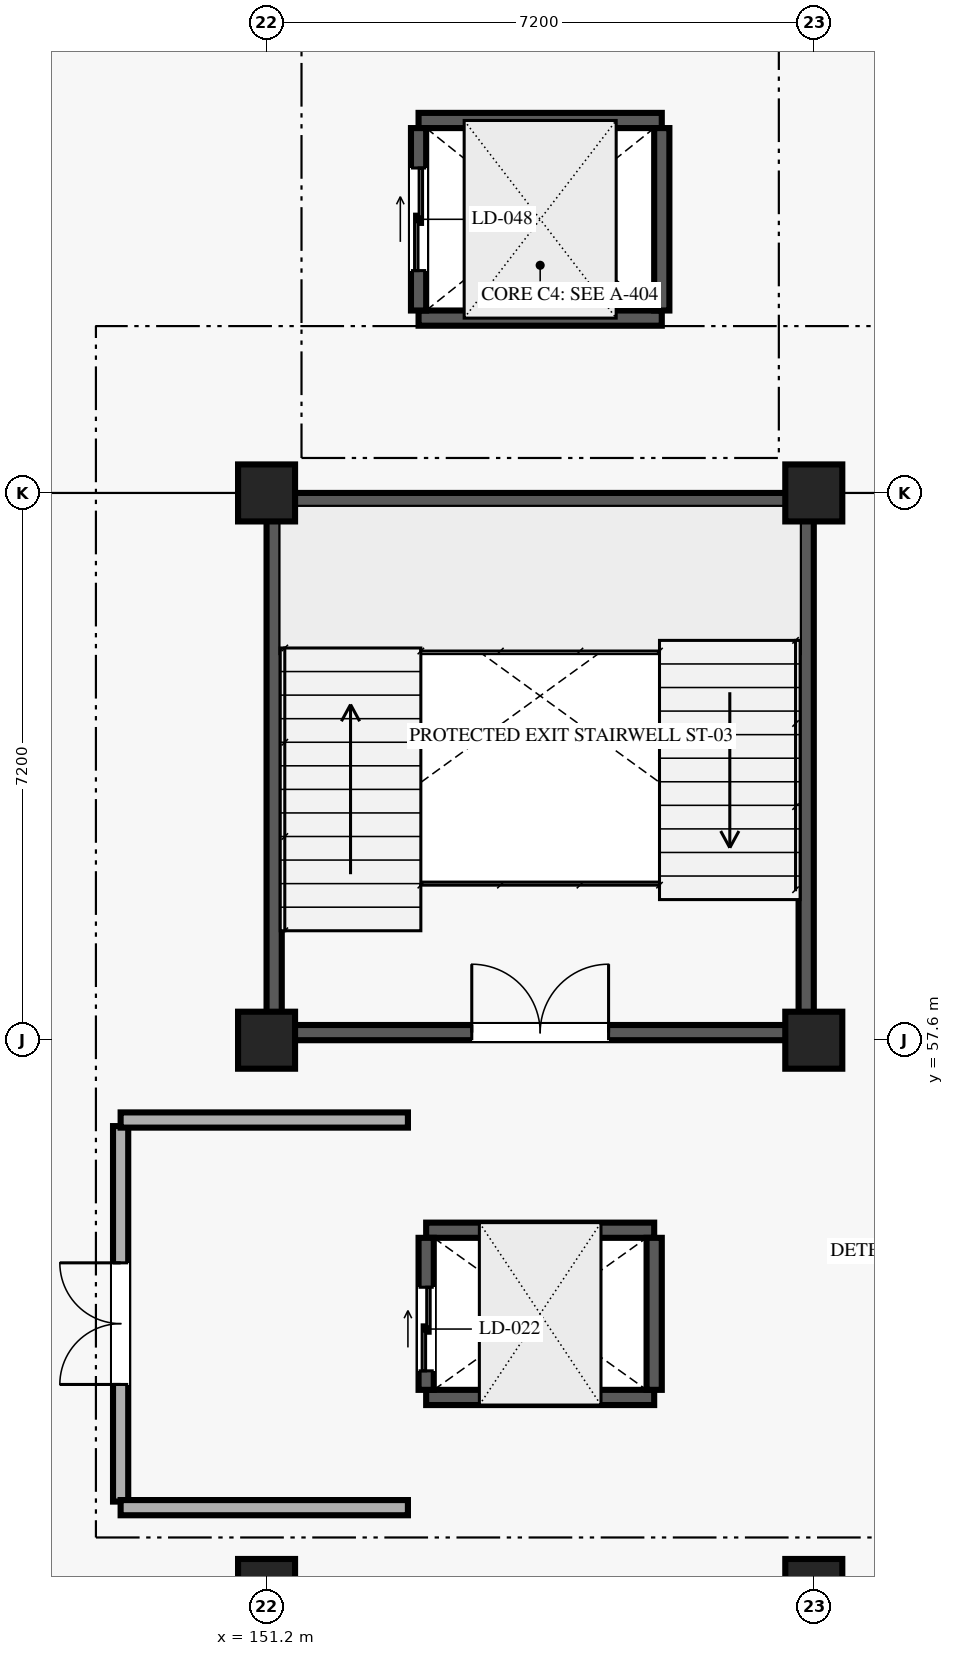
"""IFC4 building model, lengths in metres.
Left out: names, types, materials, properties, quantities, classifications, styles, units other than length and angle.
Written with IfcOpenShell. Run it as: python <this file> out.ifc"""

import sys

from ifc_helpers import new_model, si_unit, direction, frame, frame_2d, origin, origin_2d, place, context, subcontext, project, spatial, rectangle, extrude, element, fill, save


model = new_model("IFC4")
c1 = context("Model", 3, precision=1e-05, world=origin(), true_north=direction((0.0, 1.0)))
c2 = subcontext(c1, "Body", "Model", "MODEL_VIEW")
j1 = project(units=[si_unit("LENGTHUNIT", "METRE"), si_unit("PLANEANGLEUNIT", "RADIAN")], contexts=[c1])
p1 = place(None, origin())
s1 = spatial("IfcSite", under=j1, at=p1, CompositionType="ELEMENT")
p2 = place(p1, origin())
s2 = spatial("IfcBuilding", under=s1, at=p2, CompositionType="ELEMENT")
p3 = place(p2, frame((0.0, 0.0, 9.45)))
s3 = spatial("IfcBuildingStorey", under=s2, at=p3, CompositionType="ELEMENT", Elevation=9.45)
for number, where, z_axis, x_axis in (
    (1, (151.2, 50.4, 0.0), (0.0, 0.0, 1.0), (1.0, 0.0, 0.0)),
    (2, (151.2, 57.6, 0.0), (0.0, 0.0, 1.0), (1.0, 0.0, 0.0)),
    (3, (151.2, 64.8, 0.0), (0.0, 0.0, 1.0), (1.0, 0.0, 0.0)),
    (4, (158.4, 50.4, 0.0), (0.0, 0.0, 1.0), (1.0, 0.0, 0.0)),
    (5, (158.4, 57.6, 0.0), (0.0, 0.0, 1.0), (1.0, 0.0, 0.0)),
    (6, (158.4, 64.8, 0.0), (0.0, 0.0, 1.0), (1.0, 0.0, 0.0)),
):
    element("IfcColumn", number, at=place(p3, frame(where, z_axis=z_axis, x_axis=x_axis)), inside=s3, PredefinedType="COLUMN", context=c2, shape_type="SweptSolid", body=[
        extrude(rectangle(XDim=0.75, YDim=0.75, at=origin_2d()), origin(), (0.0, 0.0, 1.0), 4.05),
    ])
p4 = place(p3, frame((151.4, 57.7, 0.0), z_axis=(0.0, 0.0, 1.0), x_axis=(1.0, 0.0, 0.0)))
e7 = element("IfcWall", 7, at=p4, inside=s3, PredefinedType="SHEAR", context=c2, shape_type="SweptSolid", body=[
    extrude(rectangle(XDim=6.8, YDim=0.2, at=frame_2d((3.4, 0.0))), origin(), (0.0, 0.0, 1.0), 3.81),
])
p5 = place(p4, frame((2.5, 0.0, 0.0)))
e8 = element("IfcOpeningElement", 8, at=p5, cuts=e7, PredefinedType="OPENING", context=c2, shape_type="SweptSolid", body=[
    extrude(rectangle(XDim=1.8, YDim=2.2, at=frame_2d((0.9, 1.1))), frame((0.0, 0.11, 0.0), z_axis=(0.0, -1.0, 0.0), x_axis=(1.0, 0.0, 0.0)), (0.0, 0.0, 1.0), 0.22),
])
for number, where, z_axis, x_axis in (
    (9, (151.4, 64.7, 0.0), (0.0, 0.0, 1.0), (1.0, 0.0, 0.0)),
    (10, (151.3, 57.8, 0.0), (0.0, 0.0, 1.0), (0.0, 1.0, 0.0)),
    (11, (158.3, 57.8, 0.0), (0.0, 0.0, 1.0), (0.0, 1.0, 0.0)),
):
    element("IfcWall", number, at=place(p3, frame(where, z_axis=z_axis, x_axis=x_axis)), inside=s3, PredefinedType="SHEAR", context=c2, shape_type="SweptSolid", body=[
        extrude(rectangle(XDim=6.8, YDim=0.2, at=frame_2d((3.4, 0.0))), origin(), (0.0, 0.0, 1.0), 3.81),
    ])
for number, where, z_axis, x_axis in (
    (12, (153.3, 52.9, 0.0), (0.0, 0.0, 1.0), (1.0, 0.0, 0.0)),
    (13, (153.3, 55.1, 0.0), (0.0, 0.0, 1.0), (1.0, 0.0, 0.0)),
):
    element("IfcWall", number, at=place(p3, frame(where, z_axis=z_axis, x_axis=x_axis)), inside=s3, PredefinedType="SHEAR", context=c2, shape_type="SweptSolid", body=[
        extrude(rectangle(XDim=3.0, YDim=0.2, at=frame_2d((1.5, 0.0))), origin(), (0.0, 0.0, 1.0), 3.81),
    ])
p6 = place(p3, frame((153.3, 53.0, 0.0), z_axis=(0.0, 0.0, 1.0), x_axis=(0.0, 1.0, 0.0)))
e14 = element("IfcWall", 14, at=p6, inside=s3, PredefinedType="SHEAR", context=c2, shape_type="SweptSolid", body=[
    extrude(rectangle(XDim=2.0, YDim=0.2, at=frame_2d((1.0, 0.0))), origin(), (0.0, 0.0, 1.0), 3.81),
])
p7 = place(p6, frame((0.25, 0.0, 0.0)))
e15 = element("IfcOpeningElement", 15, at=p7, cuts=e14, PredefinedType="OPENING", context=c2, shape_type="SweptSolid", body=[
    extrude(rectangle(XDim=1.1, YDim=2.15, at=frame_2d((0.55, 1.075))), frame((0.0, 0.11, 0.0), z_axis=(0.0, -1.0, 0.0), x_axis=(1.0, 0.0, 0.0)), (0.0, 0.0, 1.0), 0.22),
])
p8 = place(p3, frame((156.3, 53.0, 0.0), z_axis=(0.0, 0.0, 1.0), x_axis=(0.0, 1.0, 0.0)))
e16 = element("IfcWall", 16, at=p8, inside=s3, PredefinedType="SHEAR", context=c2, shape_type="SweptSolid", body=[
    extrude(rectangle(XDim=2.0, YDim=0.2, at=frame_2d((1.0, 0.0))), origin(), (0.0, 0.0, 1.0), 3.81),
])
for number, where, z_axis, x_axis in (
    (17, (153.2, 67.1, 0.0), (0.0, 0.0, 1.0), (1.0, 0.0, 0.0)),
    (18, (153.2, 69.7, 0.0), (0.0, 0.0, 1.0), (1.0, 0.0, 0.0)),
):
    element("IfcWall", number, at=place(p3, frame(where, z_axis=z_axis, x_axis=x_axis)), inside=s3, PredefinedType="SHEAR", context=c2, shape_type="SweptSolid", body=[
        extrude(rectangle(XDim=3.2, YDim=0.2, at=frame_2d((1.6, 0.0))), origin(), (0.0, 0.0, 1.0), 3.81),
    ])
p9 = place(p3, frame((153.2, 67.2, 0.0), z_axis=(0.0, 0.0, 1.0), x_axis=(0.0, 1.0, 0.0)))
e19 = element("IfcWall", 19, at=p9, inside=s3, PredefinedType="SHEAR", context=c2, shape_type="SweptSolid", body=[
    extrude(rectangle(XDim=2.4, YDim=0.2, at=frame_2d((1.2, 0.0))), origin(), (0.0, 0.0, 1.0), 3.81),
])
p10 = place(p9, frame((0.525, 0.0, 0.0)))
e20 = element("IfcOpeningElement", 20, at=p10, cuts=e19, PredefinedType="OPENING", context=c2, shape_type="SweptSolid", body=[
    extrude(rectangle(XDim=1.35, YDim=2.2, at=frame_2d((0.675, 1.1))), frame((0.0, 0.11, 0.0), z_axis=(0.0, -1.0, 0.0), x_axis=(1.0, 0.0, 0.0)), (0.0, 0.0, 1.0), 0.22),
])
p11 = place(p3, frame((156.4, 67.2, 0.0), z_axis=(0.0, 0.0, 1.0), x_axis=(0.0, 1.0, 0.0)))
e21 = element("IfcWall", 21, at=p11, inside=s3, PredefinedType="SHEAR", context=c2, shape_type="SweptSolid", body=[
    extrude(rectangle(XDim=2.4, YDim=0.2, at=frame_2d((1.2, 0.0))), origin(), (0.0, 0.0, 1.0), 3.81),
])
p12 = place(p3, frame((149.28, 51.53, 0.0), z_axis=(0.0, 0.0, 1.0), x_axis=(0.0, 1.0, 0.0)))
e22 = element("IfcWall", 22, at=p12, inside=s3, PredefinedType="SOLIDWALL", context=c2, shape_type="SweptSolid", body=[
    extrude(rectangle(XDim=4.94, YDim=0.2, at=frame_2d((2.47, 0.0))), origin(), (0.0, 0.0, 1.0), 3.81),
])
p13 = place(p12, frame((1.541, 0.0, 0.0)))
e23 = element("IfcOpeningElement", 23, at=p13, cuts=e22, PredefinedType="OPENING", context=c2, shape_type="SweptSolid", body=[
    extrude(rectangle(XDim=1.6, YDim=2.2, at=frame_2d((0.8, 1.1))), frame((0.0, 0.11, 0.0), z_axis=(0.0, -1.0, 0.0), x_axis=(1.0, 0.0, 0.0)), (0.0, 0.0, 1.0), 0.22),
])
for number, where, z_axis, x_axis in (
    (24, (149.28, 51.45, 0.0), (0.0, 0.0, 1.0), (1.0, 0.0, 0.0)),
    (25, (149.28, 56.55, 0.0), (0.0, 0.0, 1.0), (1.0, 0.0, 0.0)),
):
    element("IfcWall", number, at=place(p3, frame(where, z_axis=z_axis, x_axis=x_axis)), inside=s3, PredefinedType="SOLIDWALL", context=c2, shape_type="SweptSolid", body=[
        extrude(rectangle(XDim=3.78, YDim=0.2, at=frame_2d((1.89, 0.0))), origin(), (0.0, 0.0, 1.0), 3.81),
    ])
p14 = place(p5, origin())
e26 = element("IfcDoor", 26, at=p14, inside=s3, OperationType="DOUBLE_DOOR_SINGLE_SWING", PredefinedType="DOOR", context=c2, shape_type="SweptSolid", body=[
    extrude(rectangle(XDim=1.8, YDim=2.2, at=frame_2d((0.9, 1.1))), frame((0.0, 0.025, 0.0), z_axis=(0.0, -1.0, 0.0), x_axis=(1.0, 0.0, 0.0)), (0.0, 0.0, 1.0), 0.05),
])
fill(e8, e26)
p15 = place(p7, origin())
e27 = element("IfcDoor", 27, at=p15, inside=s3, OperationType="DOUBLE_DOOR_SLIDING", PredefinedType="DOOR", context=c2, shape_type="SweptSolid", body=[
    extrude(rectangle(XDim=1.1, YDim=2.15, at=frame_2d((0.55, 1.075))), frame((0.0, 0.025, 0.0), z_axis=(0.0, -1.0, 0.0), x_axis=(1.0, 0.0, 0.0)), (0.0, 0.0, 1.0), 0.05),
])
fill(e15, e27)
p16 = place(p10, origin())
e28 = element("IfcDoor", 28, at=p16, inside=s3, OperationType="DOUBLE_DOOR_SLIDING", PredefinedType="DOOR", context=c2, shape_type="SweptSolid", body=[
    extrude(rectangle(XDim=1.35, YDim=2.2, at=frame_2d((0.675, 1.1))), frame((0.0, 0.025, 0.0), z_axis=(0.0, -1.0, 0.0), x_axis=(1.0, 0.0, 0.0)), (0.0, 0.0, 1.0), 0.05),
])
fill(e20, e28)
p17 = place(p13, origin())
e29 = element("IfcDoor", 29, at=p17, inside=s3, OperationType="DOUBLE_DOOR_SINGLE_SWING", PredefinedType="DOOR", context=c2, shape_type="SweptSolid", body=[
    extrude(rectangle(XDim=1.6, YDim=2.2, at=frame_2d((0.8, 1.1))), frame((0.0, 0.025, 0.0), z_axis=(0.0, -1.0, 0.0), x_axis=(1.0, 0.0, 0.0)), (0.0, 0.0, 1.0), 0.05),
])
fill(e23, e29)
save(model, sys.argv[1])
